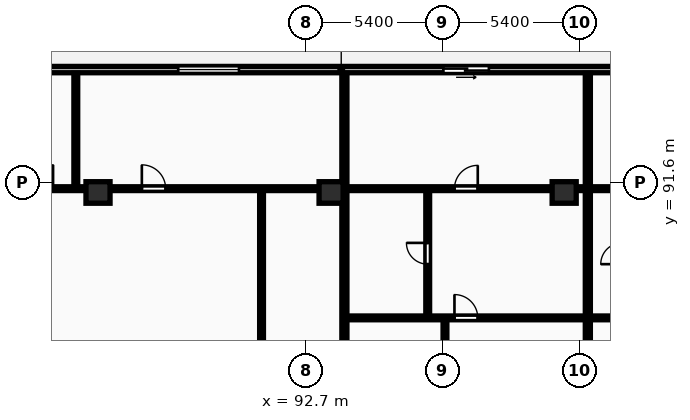
"""IFC4 building model, lengths in metres.
Left out: names, types, materials, properties, quantities, classifications, styles, units other than length and angle.
Written with IfcOpenShell. Run it as: python <this file> out.ifc"""

import sys

from ifc_helpers import new_model, si_unit, direction, frame, frame_2d, origin, origin_2d, place, context, subcontext, project, spatial, rectangle, extrude, element, fill, save


model = new_model("IFC4")
c1 = context("Model", 3, precision=1e-05, world=origin(), true_north=direction((0.0, 1.0)))
c2 = subcontext(c1, "Body", "Model", "MODEL_VIEW")
j1 = project(units=[si_unit("LENGTHUNIT", "METRE"), si_unit("PLANEANGLEUNIT", "RADIAN")], contexts=[c1])
p1 = place(None, origin())
s1 = spatial("IfcSite", under=j1, at=p1, CompositionType="ELEMENT")
p2 = place(p1, origin())
s2 = spatial("IfcBuilding", under=s1, at=p2, CompositionType="ELEMENT")
p3 = place(p2, frame((0.0, 0.0, 100.3)))
s3 = spatial("IfcBuildingStorey", under=s2, at=p3, CompositionType="ELEMENT", Elevation=100.3)
for number, where, z_axis, x_axis in (
    (1, (84.5, 91.2, 0.0), (0.0, 0.0, 1.0), (1.0, 0.0, 0.0)),
    (2, (93.7, 91.2, 0.0), (0.0, 0.0, 1.0), (1.0, 0.0, 0.0)),
    (3, (102.9, 91.2, 0.0), (0.0, 0.0, 1.0), (1.0, 0.0, 0.0)),
):
    element("IfcColumn", number, at=place(p3, frame(where, z_axis=z_axis, x_axis=x_axis)), inside=s3, PredefinedType="COLUMN", context=c2, shape_type="SweptSolid", body=[
        extrude(rectangle(XDim=0.95, YDim=0.85, at=origin_2d()), origin(), (0.0, 0.0, 1.0), 3.25),
    ])
p4 = place(p3, frame((130.6, 96.05, 0.0), z_axis=(0.0, 0.0, 1.0), x_axis=(-1.0, 0.0, 0.0)))
e4 = element("IfcWall", 4, at=p4, inside=s3, PredefinedType="STANDARD", context=c2, shape_type="SweptSolid", body=[
    extrude(rectangle(XDim=73.0, YDim=0.25, at=frame_2d((36.5, 0.0))), origin(), (0.0, 0.0, 1.0), 2.97),
])
p5 = place(p4, frame((68.242, 0.0, 0.0)))
e5 = element("IfcOpeningElement", 5, at=p5, cuts=e4, PredefinedType="OPENING", context=c2, shape_type="SweptSolid", body=[
    extrude(rectangle(XDim=1.8, YDim=2.2, at=frame_2d((0.9, 1.1))), frame((0.0, 0.135, 0.0), z_axis=(0.0, -1.0, 0.0), x_axis=(1.0, 0.0, 0.0)), (0.0, 0.0, 1.0), 0.27),
])
p6 = place(p4, frame((59.046, 0.0, 0.85)))
e6 = element("IfcOpeningElement", 6, at=p6, cuts=e4, PredefinedType="OPENING", context=c2, shape_type="SweptSolid", body=[
    extrude(rectangle(XDim=2.4, YDim=1.9, at=frame_2d((1.2, 0.95))), frame((0.0, 0.135, 0.0), z_axis=(0.0, -1.0, 0.0), x_axis=(1.0, 0.0, 0.0)), (0.0, 0.0, 1.0), 0.27),
])
p7 = place(p4, frame((50.012, 0.0, 0.0)))
e7 = element("IfcOpeningElement", 7, at=p7, cuts=e4, PredefinedType="OPENING", context=c2, shape_type="SweptSolid", body=[
    extrude(rectangle(XDim=1.8, YDim=2.2, at=frame_2d((0.9, 1.1))), frame((0.0, 0.135, 0.0), z_axis=(0.0, -1.0, 0.0), x_axis=(1.0, 0.0, 0.0)), (0.0, 0.0, 1.0), 0.27),
])
p8 = place(p4, frame((40.536, 0.0, 0.85)))
e8 = element("IfcOpeningElement", 8, at=p8, cuts=e4, PredefinedType="OPENING", context=c2, shape_type="SweptSolid", body=[
    extrude(rectangle(XDim=2.4, YDim=1.9, at=frame_2d((1.2, 0.95))), frame((0.0, 0.135, 0.0), z_axis=(0.0, -1.0, 0.0), x_axis=(1.0, 0.0, 0.0)), (0.0, 0.0, 1.0), 0.27),
])
p9 = place(p4, frame((30.67, 0.0, 0.0)))
e9 = element("IfcOpeningElement", 9, at=p9, cuts=e4, PredefinedType="OPENING", context=c2, shape_type="SweptSolid", body=[
    extrude(rectangle(XDim=1.8, YDim=2.2, at=frame_2d((0.9, 1.1))), frame((0.0, 0.135, 0.0), z_axis=(0.0, -1.0, 0.0), x_axis=(1.0, 0.0, 0.0)), (0.0, 0.0, 1.0), 0.27),
])
p10 = place(p4, frame((20.781, 0.0, 0.0)))
e10 = element("IfcOpeningElement", 10, at=p10, cuts=e4, PredefinedType="OPENING", context=c2, shape_type="SweptSolid", body=[
    extrude(rectangle(XDim=1.8, YDim=2.2, at=frame_2d((0.9, 1.1))), frame((0.0, 0.135, 0.0), z_axis=(0.0, -1.0, 0.0), x_axis=(1.0, 0.0, 0.0)), (0.0, 0.0, 1.0), 0.27),
])
p11 = place(p4, frame((9.423, 0.0, 0.85)))
e11 = element("IfcOpeningElement", 11, at=p11, cuts=e4, PredefinedType="OPENING", context=c2, shape_type="SweptSolid", body=[
    extrude(rectangle(XDim=1.8, YDim=1.8, at=frame_2d((0.9, 0.9))), frame((0.0, 0.135, 0.0), z_axis=(0.0, -1.0, 0.0), x_axis=(1.0, 0.0, 0.0)), (0.0, 0.0, 1.0), 0.27),
])
p12 = place(p4, frame((5.66, 0.0, 0.85)))
e12 = element("IfcOpeningElement", 12, at=p12, cuts=e4, PredefinedType="OPENING", context=c2, shape_type="SweptSolid", body=[
    extrude(rectangle(XDim=1.8, YDim=1.8, at=frame_2d((0.9, 0.9))), frame((0.0, 0.135, 0.0), z_axis=(0.0, -1.0, 0.0), x_axis=(1.0, 0.0, 0.0)), (0.0, 0.0, 1.0), 0.27),
])
p13 = place(p4, frame((13.451, 0.0, 0.0)))
e13 = element("IfcOpeningElement", 13, at=p13, cuts=e4, PredefinedType="OPENING", context=c2, shape_type="SweptSolid", body=[
    extrude(rectangle(XDim=1.8, YDim=2.2, at=frame_2d((0.9, 1.1))), frame((0.0, 0.135, 0.0), z_axis=(0.0, -1.0, 0.0), x_axis=(1.0, 0.0, 0.0)), (0.0, 0.0, 1.0), 0.27),
])
p14 = place(p4, frame((1.21, 0.0, 0.85)))
e14 = element("IfcOpeningElement", 14, at=p14, cuts=e4, PredefinedType="OPENING", context=c2, shape_type="SweptSolid", body=[
    extrude(rectangle(XDim=2.4, YDim=1.9, at=frame_2d((1.2, 0.95))), frame((0.0, 0.135, 0.0), z_axis=(0.0, -1.0, 0.0), x_axis=(1.0, 0.0, 0.0)), (0.0, 0.0, 1.0), 0.27),
])
p15 = place(p3, frame((94.225, 69.83, 0.0), z_axis=(0.0, 0.0, 1.0), x_axis=(0.0, 1.0, 0.0)))
e15 = element("IfcWall", 15, at=p15, inside=s3, PredefinedType="PARTITIONING", context=c2, shape_type="SweptSolid", body=[
    extrude(rectangle(XDim=26.07, YDim=0.2, at=frame_2d((13.035, 0.0))), origin(), (0.0, 0.0, 1.0), 2.97),
])
p16 = place(p3, frame((90.955, 69.81, 0.0), z_axis=(0.0, 0.0, 1.0), x_axis=(0.0, 1.0, 0.0)))
e16 = element("IfcWall", 16, at=p16, inside=s3, PredefinedType="PARTITIONING", context=c2, shape_type="SweptSolid", body=[
    extrude(rectangle(XDim=21.48, YDim=0.15, at=frame_2d((10.74, 0.0))), origin(), (0.0, 0.0, 1.0), 2.97),
])
p17 = place(p16, frame((2.406, 0.0, 0.0)))
e17 = element("IfcOpeningElement", 17, at=p17, cuts=e16, PredefinedType="OPENING", context=c2, shape_type="SweptSolid", body=[
    extrude(rectangle(XDim=0.96, YDim=2.1, at=frame_2d((0.48, 1.05))), frame((0.0, 0.085, 0.0), z_axis=(0.0, -1.0, 0.0), x_axis=(1.0, 0.0, 0.0)), (0.0, 0.0, 1.0), 0.17),
])
p18 = place(p16, frame((6.133, 0.0, 0.0)))
e18 = element("IfcOpeningElement", 18, at=p18, cuts=e16, PredefinedType="OPENING", context=c2, shape_type="SweptSolid", body=[
    extrude(rectangle(XDim=0.88, YDim=2.06, at=frame_2d((0.44, 1.03))), frame((0.0, 0.085, 0.0), z_axis=(0.0, -1.0, 0.0), x_axis=(1.0, 0.0, 0.0)), (0.0, 0.0, 1.0), 0.17),
])
p19 = place(p16, frame((10.32, 0.0, 0.0)))
e19 = element("IfcOpeningElement", 19, at=p19, cuts=e16, PredefinedType="OPENING", context=c2, shape_type="SweptSolid", body=[
    extrude(rectangle(XDim=0.84, YDim=2.04, at=frame_2d((0.42, 1.02))), frame((0.0, 0.085, 0.0), z_axis=(0.0, -1.0, 0.0), x_axis=(1.0, 0.0, 0.0)), (0.0, 0.0, 1.0), 0.17),
])
p20 = place(p3, frame((83.624, 91.43, 0.0), z_axis=(0.0, 0.0, 1.0), x_axis=(0.0, 1.0, 0.0)))
e20 = element("IfcWall", 20, at=p20, inside=s3, PredefinedType="PARTITIONING", context=c2, shape_type="SweptSolid", body=[
    extrude(rectangle(XDim=4.47, YDim=0.15, at=frame_2d((2.235, 0.0))), origin(), (0.0, 0.0, 1.0), 2.97),
])
p21 = place(p3, frame((75.712, 91.35, 0.0), z_axis=(0.0, 0.0, 1.0), x_axis=(1.0, 0.0, 0.0)))
e21 = element("IfcWall", 21, at=p21, inside=s3, PredefinedType="PARTITIONING", context=c2, shape_type="SweptSolid", body=[
    extrude(rectangle(XDim=18.433, YDim=0.15, at=frame_2d((9.216, 0.0))), origin(), (0.0, 0.0, 1.0), 2.663),
])
p22 = place(p21, frame((6.074, 0.0, 0.0)))
e22 = element("IfcOpeningElement", 22, at=p22, cuts=e21, PredefinedType="OPENING", context=c2, shape_type="SweptSolid", body=[
    extrude(rectangle(XDim=0.94, YDim=2.1, at=frame_2d((0.47, 1.05))), frame((0.0, 0.085, 0.0), z_axis=(0.0, -1.0, 0.0), x_axis=(1.0, 0.0, 0.0)), (0.0, 0.0, 1.0), 0.17),
])
p23 = place(p21, frame((10.518, 0.0, 0.0)))
e23 = element("IfcOpeningElement", 23, at=p23, cuts=e21, PredefinedType="OPENING", context=c2, shape_type="SweptSolid", body=[
    extrude(rectangle(XDim=0.94, YDim=2.1, at=frame_2d((0.47, 1.05))), frame((0.0, 0.085, 0.0), z_axis=(0.0, -1.0, 0.0), x_axis=(1.0, 0.0, 0.0)), (0.0, 0.0, 1.0), 0.17),
])
p24 = place(p3, frame((103.834, 69.83, 0.0), z_axis=(0.0, 0.0, 1.0), x_axis=(0.0, 1.0, 0.0)))
e24 = element("IfcWall", 24, at=p24, inside=s3, PredefinedType="PARTITIONING", context=c2, shape_type="SweptSolid", body=[
    extrude(rectangle(XDim=26.07, YDim=0.2, at=frame_2d((13.035, 0.0))), origin(), (0.0, 0.0, 1.0), 2.97),
])
p25 = place(p3, frame((98.195, 69.81, 0.0), z_axis=(0.0, 0.0, 1.0), x_axis=(0.0, 1.0, 0.0)))
e25 = element("IfcWall", 25, at=p25, inside=s3, PredefinedType="PARTITIONING", context=c2, shape_type="SweptSolid", body=[
    extrude(rectangle(XDim=16.4, YDim=0.15, at=frame_2d((8.2, 0.0))), origin(), (0.0, 0.0, 1.0), 2.97),
])
p26 = place(p25, frame((6.89, 0.0, 0.0)))
e26 = element("IfcOpeningElement", 26, at=p26, cuts=e25, PredefinedType="OPENING", context=c2, shape_type="SweptSolid", body=[
    extrude(rectangle(XDim=0.88, YDim=2.06, at=frame_2d((0.44, 1.03))), frame((0.0, 0.085, 0.0), z_axis=(0.0, -1.0, 0.0), x_axis=(1.0, 0.0, 0.0)), (0.0, 0.0, 1.0), 0.17),
])
p27 = place(p3, frame((97.514, 86.29, 0.0), z_axis=(0.0, 0.0, 1.0), x_axis=(0.0, 1.0, 0.0)))
e27 = element("IfcWall", 27, at=p27, inside=s3, PredefinedType="PARTITIONING", context=c2, shape_type="SweptSolid", body=[
    extrude(rectangle(XDim=5.0, YDim=0.15, at=frame_2d((2.5, 0.0))), origin(), (0.0, 0.0, 1.0), 2.97),
])
p28 = place(p27, frame((2.08, 0.0, 0.0)))
e28 = element("IfcOpeningElement", 28, at=p28, cuts=e27, PredefinedType="OPENING", context=c2, shape_type="SweptSolid", body=[
    extrude(rectangle(XDim=0.84, YDim=2.04, at=frame_2d((0.42, 1.02))), frame((0.0, 0.085, 0.0), z_axis=(0.0, -1.0, 0.0), x_axis=(1.0, 0.0, 0.0)), (0.0, 0.0, 1.0), 0.17),
])
p29 = place(p3, frame((94.305, 86.25, 0.0), z_axis=(0.0, 0.0, 1.0), x_axis=(1.0, 0.0, 0.0)))
e29 = element("IfcWall", 29, at=p29, inside=s3, PredefinedType="PARTITIONING", context=c2, shape_type="SweptSolid", body=[
    extrude(rectangle(XDim=9.449, YDim=0.15, at=frame_2d((4.725, 0.0))), origin(), (0.0, 0.0, 1.0), 2.97),
])
p30 = place(p29, frame((4.264, 0.0, 0.0)))
e30 = element("IfcOpeningElement", 30, at=p30, cuts=e29, PredefinedType="OPENING", context=c2, shape_type="SweptSolid", body=[
    extrude(rectangle(XDim=0.92, YDim=2.08, at=frame_2d((0.46, 1.04))), frame((0.0, 0.085, 0.0), z_axis=(0.0, -1.0, 0.0), x_axis=(1.0, 0.0, 0.0)), (0.0, 0.0, 1.0), 0.17),
])
p31 = place(p3, frame((94.305, 91.35, 0.0), z_axis=(0.0, 0.0, 1.0), x_axis=(1.0, 0.0, 0.0)))
e31 = element("IfcWall", 31, at=p31, inside=s3, PredefinedType="PARTITIONING", context=c2, shape_type="SweptSolid", body=[
    extrude(rectangle(XDim=9.449, YDim=0.15, at=frame_2d((4.725, 0.0))), origin(), (0.0, 0.0, 1.0), 2.663),
])
p32 = place(p31, frame((4.264, 0.0, 0.0)))
e32 = element("IfcOpeningElement", 32, at=p32, cuts=e31, PredefinedType="OPENING", context=c2, shape_type="SweptSolid", body=[
    extrude(rectangle(XDim=0.92, YDim=2.08, at=frame_2d((0.46, 1.04))), frame((0.0, 0.085, 0.0), z_axis=(0.0, -1.0, 0.0), x_axis=(1.0, 0.0, 0.0)), (0.0, 0.0, 1.0), 0.17),
])
p33 = place(p3, frame((103.914, 86.25, 0.0), z_axis=(0.0, 0.0, 1.0), x_axis=(1.0, 0.0, 0.0)))
e33 = element("IfcWall", 33, at=p33, inside=s3, PredefinedType="PARTITIONING", context=c2, shape_type="SweptSolid", body=[
    extrude(rectangle(XDim=10.01, YDim=0.15, at=frame_2d((5.005, 0.0))), origin(), (0.0, 0.0, 1.0), 2.97),
])
p34 = place(p33, frame((4.545, 0.0, 0.0)))
e34 = element("IfcOpeningElement", 34, at=p34, cuts=e33, PredefinedType="OPENING", context=c2, shape_type="SweptSolid", body=[
    extrude(rectangle(XDim=0.92, YDim=2.08, at=frame_2d((0.46, 1.04))), frame((0.0, 0.085, 0.0), z_axis=(0.0, -1.0, 0.0), x_axis=(1.0, 0.0, 0.0)), (0.0, 0.0, 1.0), 0.17),
])
p35 = place(p3, frame((103.914, 91.35, 0.0), z_axis=(0.0, 0.0, 1.0), x_axis=(1.0, 0.0, 0.0)))
e35 = element("IfcWall", 35, at=p35, inside=s3, PredefinedType="PARTITIONING", context=c2, shape_type="SweptSolid", body=[
    extrude(rectangle(XDim=10.01, YDim=0.15, at=frame_2d((5.005, 0.0))), origin(), (0.0, 0.0, 1.0), 2.663),
])
p36 = place(p35, frame((4.545, 0.0, 0.0)))
e36 = element("IfcOpeningElement", 36, at=p36, cuts=e35, PredefinedType="OPENING", context=c2, shape_type="SweptSolid", body=[
    extrude(rectangle(XDim=0.92, YDim=2.08, at=frame_2d((0.46, 1.04))), frame((0.0, 0.085, 0.0), z_axis=(0.0, -1.0, 0.0), x_axis=(1.0, 0.0, 0.0)), (0.0, 0.0, 1.0), 0.17),
])
p37 = place(p8, origin())
e37 = element("IfcWindow", 37, at=p37, inside=s3, PartitioningType="DOUBLE_PANEL_VERTICAL", PredefinedType="WINDOW", context=c2, shape_type="SweptSolid", body=[
    extrude(rectangle(XDim=2.4, YDim=1.9, at=frame_2d((1.2, 0.95))), frame((0.0, 0.03, 0.0), z_axis=(0.0, -1.0, 0.0), x_axis=(1.0, 0.0, 0.0)), (0.0, 0.0, 1.0), 0.06),
])
fill(e8, e37)
p38 = place(p9, origin())
e38 = element("IfcDoor", 38, at=p38, inside=s3, OperationType="SLIDING_TO_LEFT", PredefinedType="DOOR", context=c2, shape_type="SweptSolid", body=[
    extrude(rectangle(XDim=1.8, YDim=2.2, at=frame_2d((0.9, 1.1))), frame((0.0, 0.025, 0.0), z_axis=(0.0, -1.0, 0.0), x_axis=(1.0, 0.0, 0.0)), (0.0, 0.0, 1.0), 0.05),
])
fill(e9, e38)
p39 = place(p22, origin())
e39 = element("IfcDoor", 39, at=p39, inside=s3, OperationType="SINGLE_SWING_RIGHT", PredefinedType="DOOR", context=c2, shape_type="SweptSolid", body=[
    extrude(rectangle(XDim=0.94, YDim=2.1, at=frame_2d((0.47, 1.05))), frame((0.0, 0.025, 0.0), z_axis=(0.0, -1.0, 0.0), x_axis=(1.0, 0.0, 0.0)), (0.0, 0.0, 1.0), 0.05),
])
fill(e22, e39)
p40 = place(p23, origin())
e40 = element("IfcDoor", 40, at=p40, inside=s3, OperationType="SINGLE_SWING_LEFT", PredefinedType="DOOR", context=c2, shape_type="SweptSolid", body=[
    extrude(rectangle(XDim=0.94, YDim=2.1, at=frame_2d((0.47, 1.05))), frame((0.0, 0.025, 0.0), z_axis=(0.0, -1.0, 0.0), x_axis=(1.0, 0.0, 0.0)), (0.0, 0.0, 1.0), 0.05),
])
fill(e23, e40)
p41 = place(p28, origin())
e41 = element("IfcDoor", 41, at=p41, inside=s3, OperationType="SINGLE_SWING_RIGHT", PredefinedType="DOOR", context=c2, shape_type="SweptSolid", body=[
    extrude(rectangle(XDim=0.84, YDim=2.04, at=frame_2d((0.42, 1.02))), frame((0.0, 0.025, 0.0), z_axis=(0.0, -1.0, 0.0), x_axis=(1.0, 0.0, 0.0)), (0.0, 0.0, 1.0), 0.05),
])
fill(e28, e41)
p42 = place(p30, origin())
e42 = element("IfcDoor", 42, at=p42, inside=s3, OperationType="SINGLE_SWING_LEFT", PredefinedType="DOOR", context=c2, shape_type="SweptSolid", body=[
    extrude(rectangle(XDim=0.92, YDim=2.08, at=frame_2d((0.46, 1.04))), frame((0.0, 0.025, 0.0), z_axis=(0.0, -1.0, 0.0), x_axis=(1.0, 0.0, 0.0)), (0.0, 0.0, 1.0), 0.05),
])
fill(e30, e42)
p43 = place(p32, origin())
e43 = element("IfcDoor", 43, at=p43, inside=s3, OperationType="SINGLE_SWING_RIGHT", PredefinedType="DOOR", context=c2, shape_type="SweptSolid", body=[
    extrude(rectangle(XDim=0.92, YDim=2.08, at=frame_2d((0.46, 1.04))), frame((0.0, 0.025, 0.0), z_axis=(0.0, -1.0, 0.0), x_axis=(1.0, 0.0, 0.0)), (0.0, 0.0, 1.0), 0.05),
])
fill(e32, e43)
save(model, sys.argv[1])
